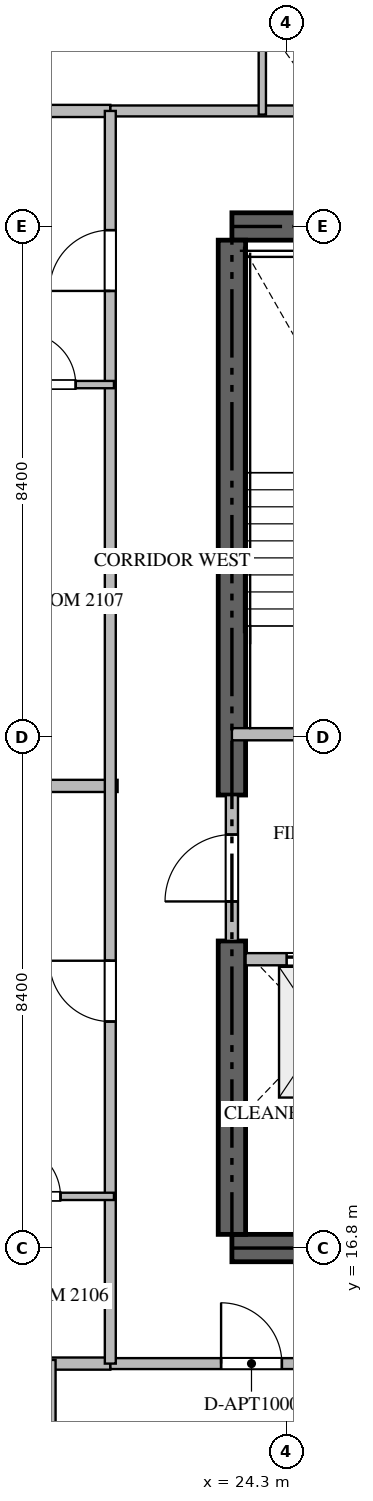
"""IFC4 building model, lengths in metres.
Left out: names, types, materials, properties, quantities, classifications, styles, units other than length and angle.
Written with IfcOpenShell. Run it as: python <this file> out.ifc"""

import sys

from ifc_helpers import new_model, si_unit, direction, frame, frame_2d, origin, place, context, subcontext, project, spatial, rectangle, extrude, source, transform, mapped, element, fill, save


model = new_model("IFC4")
c1 = context("Model", 3, precision=1e-05, world=origin(), true_north=direction((0.0, 1.0)))
c2 = subcontext(c1, "Body", "Model", "MODEL_VIEW")
j1 = project(units=[si_unit("LENGTHUNIT", "METRE"), si_unit("PLANEANGLEUNIT", "RADIAN")], contexts=[c1])
p1 = place(None, origin())
s1 = spatial("IfcSite", under=j1, at=p1, CompositionType="ELEMENT")
p2 = place(p1, origin())
s2 = spatial("IfcBuilding", under=s1, at=p2, CompositionType="ELEMENT")
p3 = place(p2, frame((0.0, 0.0, 86.7)))
s3 = spatial("IfcBuildingStorey", under=s2, at=p3, CompositionType="ELEMENT", Elevation=86.7)
for number, where, z_axis, x_axis in (
    (1, (23.4, 16.8, -0.26), (0.0, 0.0, 1.0), (1.0, 0.0, 0.0)),
    (2, (41.4, 33.6, -0.26), (0.0, 0.0, 1.0), (-1.0, 0.0, 0.0)),
):
    element("IfcWall", number, at=place(p3, frame(where, z_axis=z_axis, x_axis=x_axis)), inside=s3, PredefinedType="SHEAR", context=c2, shape_type="SweptSolid", body=[
        extrude(rectangle(XDim=18.0, YDim=0.45, at=frame_2d((9.0, 0.0))), origin(), (0.0, 0.0, 1.0), 3.748),
    ])
p4 = place(p3, frame((23.4, 17.025, -0.26), z_axis=(0.0, 0.0, 1.0), x_axis=(0.0, 1.0, 0.0)))
e3 = element("IfcWall", 3, at=p4, inside=s3, PredefinedType="SHEAR", context=c2, shape_type="SweptSolid", body=[
    extrude(rectangle(XDim=4.825, YDim=0.45, at=frame_2d((2.413, 0.0))), origin(), (0.0, 0.0, 1.0), 3.748),
])
p5 = place(p3, frame((23.4, 24.25, -0.26), z_axis=(0.0, 0.0, 1.0), x_axis=(0.0, 1.0, 0.0)))
e4 = element("IfcWall", 4, at=p5, inside=s3, PredefinedType="SHEAR", context=c2, shape_type="SweptSolid", body=[
    extrude(rectangle(XDim=9.125, YDim=0.45, at=frame_2d((4.562, 0.0))), origin(), (0.0, 0.0, 1.0), 3.748),
])
p6 = place(p3, frame((23.4, 25.25, 0.0), z_axis=(0.0, 0.0, 1.0), x_axis=(1.0, 0.0, 0.0)))
e5 = element("IfcWall", 5, at=p6, inside=s3, PredefinedType="STANDARD", context=c2, shape_type="SweptSolid", body=[
    extrude(rectangle(XDim=4.45, YDim=0.2, at=frame_2d((2.225, 0.0))), origin(), (0.0, 0.0, 1.0), 3.49),
])
p7 = place(p6, frame((1.65, 0.0, 0.0)))
e6 = element("IfcOpeningElement", 6, at=p7, cuts=e5, PredefinedType="OPENING", context=c2, shape_type="SweptSolid", body=[
    extrude(rectangle(XDim=1.1, YDim=2.15, at=frame_2d((0.55, 1.075))), frame((0.0, 0.11, 0.0), z_axis=(0.0, -1.0, 0.0), x_axis=(1.0, 0.0, 0.0)), (0.0, 0.0, 1.0), 0.22),
])
p8 = place(p3, frame((23.625, 21.55, 0.0), z_axis=(0.0, 0.0, 1.0), x_axis=(1.0, 0.0, 0.0)))
e7 = element("IfcWall", 7, at=p8, inside=s3, PredefinedType="STANDARD", context=c2, shape_type="SweptSolid", body=[
    extrude(rectangle(XDim=2.425, YDim=0.2, at=frame_2d((1.212, 0.0))), origin(), (0.0, 0.0, 1.0), 3.49),
])
p9 = place(p8, frame((0.675, 0.0, 0.0)))
e8 = element("IfcOpeningElement", 8, at=p9, cuts=e7, PredefinedType="OPENING", context=c2, shape_type="SweptSolid", body=[
    extrude(rectangle(XDim=1.2, YDim=2.2, at=frame_2d((0.6, 1.1))), frame((0.0, 0.11, 0.0), z_axis=(0.0, -1.0, 0.0), x_axis=(1.0, 0.0, 0.0)), (0.0, 0.0, 1.0), 0.22),
])
p10 = place(p3, frame((23.625, 19.05, 0.0), z_axis=(0.0, 0.0, 1.0), x_axis=(1.0, 0.0, 0.0)))
e9 = element("IfcWall", 9, at=p10, inside=s3, PredefinedType="STANDARD", context=c2, shape_type="SweptSolid", body=[
    extrude(rectangle(XDim=2.425, YDim=0.2, at=frame_2d((1.212, 0.0))), origin(), (0.0, 0.0, 1.0), 3.49),
])
p11 = place(p3, frame((23.4, 21.852, 0.0), z_axis=(0.0, 0.0, 1.0), x_axis=(0.0, 1.0, 0.0)))
e10 = element("IfcWall", 10, at=p11, inside=s3, PredefinedType="STANDARD", context=c2, shape_type="SweptSolid", body=[
    extrude(rectangle(XDim=2.396, YDim=0.2, at=frame_2d((1.198, 0.0))), origin(), (0.0, 0.0, 1.0), 3.49),
])
p12 = place(p11, frame((0.648, 0.0, 0.0)))
e11 = element("IfcOpeningElement", 11, at=p12, cuts=e10, PredefinedType="OPENING", context=c2, shape_type="SweptSolid", body=[
    extrude(rectangle(XDim=1.1, YDim=2.15, at=frame_2d((0.55, 1.075))), frame((0.0, 0.11, 0.0), z_axis=(0.0, -1.0, 0.0), x_axis=(1.0, 0.0, 0.0)), (0.0, 0.0, 1.0), 0.22),
])
p13 = place(p3, frame((6.082, 24.4, 0.0), z_axis=(0.0, 0.0, 1.0), x_axis=(1.0, 0.0, 0.0)))
e12 = element("IfcWall", 12, at=p13, inside=s3, PredefinedType="PARTITIONING", context=c2, shape_type="SweptSolid", body=[
    extrude(rectangle(XDim=15.438, YDim=0.2, at=frame_2d((7.719, 0.0))), origin(), (0.0, 0.0, 1.0), 3.49),
])
for number, where, z_axis, x_axis in (
    (13, (6.082, 14.9, 0.0), (0.0, 0.0, 1.0), (1.0, 0.0, 0.0)),
    (14, (6.082, 35.5, 0.0), (0.0, 0.0, 1.0), (1.0, 0.0, 0.0)),
):
    element("IfcWall", number, at=place(p3, frame(where, z_axis=z_axis, x_axis=x_axis)), inside=s3, PredefinedType="PARTITIONING", context=c2, shape_type="SweptSolid", body=[
        extrude(rectangle(XDim=15.318, YDim=0.2, at=frame_2d((7.659, 0.0))), origin(), (0.0, 0.0, 1.0), 3.49),
    ])
p14 = place(p3, frame((21.402, 14.9, 0.0), z_axis=(0.0, 0.0, 1.0), x_axis=(1.0, 0.0, 0.0)))
e15 = element("IfcWall", 15, at=p14, inside=s3, PredefinedType="PARTITIONING", context=c2, shape_type="SweptSolid", body=[
    extrude(rectangle(XDim=21.996, YDim=0.18, at=frame_2d((10.998, 0.0))), origin(), (0.0, 0.0, 1.0), 3.49),
])
p15 = place(p14, frame((1.82, 0.0, 0.0)))
e16 = element("IfcOpeningElement", 16, at=p15, cuts=e15, PredefinedType="OPENING", context=c2, shape_type="SweptSolid", body=[
    extrude(rectangle(XDim=1.0, YDim=2.15, at=frame_2d((0.5, 1.075))), frame((0.0, 0.1, 0.0), z_axis=(0.0, -1.0, 0.0), x_axis=(1.0, 0.0, 0.0)), (0.0, 0.0, 1.0), 0.2),
])
p16 = place(p14, frame((5.144, 0.0, 0.0)))
e17 = element("IfcOpeningElement", 17, at=p16, cuts=e15, PredefinedType="OPENING", context=c2, shape_type="SweptSolid", body=[
    extrude(rectangle(XDim=1.0, YDim=2.15, at=frame_2d((0.5, 1.075))), frame((0.0, 0.1, 0.0), z_axis=(0.0, -1.0, 0.0), x_axis=(1.0, 0.0, 0.0)), (0.0, 0.0, 1.0), 0.2),
])
p17 = place(p14, frame((11.758, 0.0, 0.0)))
e18 = element("IfcOpeningElement", 18, at=p17, cuts=e15, PredefinedType="OPENING", context=c2, shape_type="SweptSolid", body=[
    extrude(rectangle(XDim=1.0, YDim=2.15, at=frame_2d((0.5, 1.075))), frame((0.0, 0.1, 0.0), z_axis=(0.0, -1.0, 0.0), x_axis=(1.0, 0.0, 0.0)), (0.0, 0.0, 1.0), 0.2),
])
p18 = place(p14, frame((18.896, 0.0, 0.0)))
e19 = element("IfcOpeningElement", 19, at=p18, cuts=e15, PredefinedType="OPENING", context=c2, shape_type="SweptSolid", body=[
    extrude(rectangle(XDim=1.0, YDim=2.15, at=frame_2d((0.5, 1.075))), frame((0.0, 0.1, 0.0), z_axis=(0.0, -1.0, 0.0), x_axis=(1.0, 0.0, 0.0)), (0.0, 0.0, 1.0), 0.2),
])
p19 = place(p3, frame((21.402, 35.5, 0.0), z_axis=(0.0, 0.0, 1.0), x_axis=(1.0, 0.0, 0.0)))
e20 = element("IfcWall", 20, at=p19, inside=s3, PredefinedType="PARTITIONING", context=c2, shape_type="SweptSolid", body=[
    extrude(rectangle(XDim=21.996, YDim=0.18, at=frame_2d((10.998, 0.0))), origin(), (0.0, 0.0, 1.0), 3.49),
])
p20 = place(p19, frame((15.222, 0.0, 0.0)))
e21 = element("IfcOpeningElement", 21, at=p20, cuts=e20, PredefinedType="OPENING", context=c2, shape_type="SweptSolid", body=[
    extrude(rectangle(XDim=1.0, YDim=2.15, at=frame_2d((0.5, 1.075))), frame((0.0, 0.1, 0.0), z_axis=(0.0, -1.0, 0.0), x_axis=(1.0, 0.0, 0.0)), (0.0, 0.0, 1.0), 0.2),
])
p21 = place(p3, frame((21.4, 14.9, 0.0), z_axis=(0.0, 0.0, 1.0), x_axis=(0.0, 1.0, 0.0)))
e22 = element("IfcWall", 22, at=p21, inside=s3, PredefinedType="PARTITIONING", context=c2, shape_type="SweptSolid", body=[
    extrude(rectangle(XDim=20.6, YDim=0.18, at=frame_2d((10.3, 0.0))), origin(), (0.0, 0.0, 1.0), 3.49),
])
p22 = place(p21, frame((5.625, 0.0, 0.0)))
e23 = element("IfcOpeningElement", 23, at=p22, cuts=e22, PredefinedType="OPENING", context=c2, shape_type="SweptSolid", body=[
    extrude(rectangle(XDim=1.0, YDim=2.15, at=frame_2d((0.5, 1.075))), frame((0.0, 0.1, 0.0), z_axis=(0.0, -1.0, 0.0), x_axis=(1.0, 0.0, 0.0)), (0.0, 0.0, 1.0), 0.2),
])
p23 = place(p21, frame((17.64, 0.0, 0.0)))
e24 = element("IfcOpeningElement", 24, at=p23, cuts=e22, PredefinedType="OPENING", context=c2, shape_type="SweptSolid", body=[
    extrude(rectangle(XDim=1.0, YDim=2.15, at=frame_2d((0.5, 1.075))), frame((0.0, 0.1, 0.0), z_axis=(0.0, -1.0, 0.0), x_axis=(1.0, 0.0, 0.0)), (0.0, 0.0, 1.0), 0.2),
])
p24 = place(p3, frame((20.44, 12.15, 0.0), z_axis=(0.0, 0.0, 1.0), x_axis=(0.0, 1.0, 0.0)))
e25 = element("IfcWall", 25, at=p24, inside=s3, PredefinedType="PARTITIONING", context=c2, shape_type="SweptSolid", body=[
    extrude(rectangle(XDim=2.81, YDim=0.12, at=frame_2d((1.405, 0.0))), origin(), (0.0, 0.0, 1.0), 3.49),
])
p25 = place(p3, frame((23.9, 37.648, 0.0), z_axis=(0.0, 0.0, 1.0), x_axis=(0.0, -1.0, 0.0)))
e26 = element("IfcWall", 26, at=p25, inside=s3, PredefinedType="PARTITIONING", context=c2, shape_type="SweptSolid", body=[
    extrude(rectangle(XDim=2.208, YDim=0.12, at=frame_2d((1.104, 0.0))), origin(), (0.0, 0.0, 1.0), 3.49),
])
p26 = place(p3, frame((18.852, 17.65, 0.0), z_axis=(0.0, 0.0, 1.0), x_axis=(1.0, 0.0, 0.0)))
e27 = element("IfcWall", 27, at=p26, inside=s3, PredefinedType="PARTITIONING", context=c2, shape_type="SweptSolid", body=[
    extrude(rectangle(XDim=2.608, YDim=0.12, at=frame_2d((1.304, 0.0))), origin(), (0.0, 0.0, 1.0), 3.49),
])
p27 = place(p26, frame((0.879, 0.0, 0.0)))
e28 = element("IfcOpeningElement", 28, at=p27, cuts=e27, PredefinedType="OPENING", context=c2, shape_type="SweptSolid", body=[
    extrude(rectangle(XDim=0.85, YDim=2.1, at=frame_2d((0.425, 1.05))), frame((0.0, 0.07, 0.0), z_axis=(0.0, -1.0, 0.0), x_axis=(1.0, 0.0, 0.0)), (0.0, 0.0, 1.0), 0.14),
])
p28 = place(p3, frame((19.352, 31.0, 0.0), z_axis=(0.0, 0.0, 1.0), x_axis=(1.0, 0.0, 0.0)))
e29 = element("IfcWall", 29, at=p28, inside=s3, PredefinedType="PARTITIONING", context=c2, shape_type="SweptSolid", body=[
    extrude(rectangle(XDim=2.108, YDim=0.12, at=frame_2d((1.054, 0.0))), origin(), (0.0, 0.0, 1.0), 3.49),
])
p29 = place(p28, frame((0.629, 0.0, 0.0)))
e30 = element("IfcOpeningElement", 30, at=p29, cuts=e29, PredefinedType="OPENING", context=c2, shape_type="SweptSolid", body=[
    extrude(rectangle(XDim=0.85, YDim=2.1, at=frame_2d((0.425, 1.05))), frame((0.0, 0.07, 0.0), z_axis=(0.0, -1.0, 0.0), x_axis=(1.0, 0.0, 0.0)), (0.0, 0.0, 1.0), 0.14),
])
m1 = source(origin(), c2, "Body", "SweptSolid", [
    extrude(rectangle(XDim=1.2, YDim=2.2, at=frame_2d((0.6, 1.1))), frame((0.0, 0.025, 0.0), z_axis=(0.0, -1.0, 0.0), x_axis=(1.0, 0.0, 0.0)), (0.0, 0.0, 1.0), 0.05),
])
p30 = place(p9, origin())
e31 = element("IfcDoor", 31, at=p30, inside=s3, OperationType="DOUBLE_DOOR_SLIDING", PredefinedType="DOOR", context=c2, shape_type="MappedRepresentation", body=[
    mapped(m1, transform((0.0, 0.0, 0.0), scale=1.0)),
])
fill(e8, e31)
m2 = source(origin(), c2, "Body", "SweptSolid", [
    extrude(rectangle(XDim=1.1, YDim=2.15, at=frame_2d((0.55, 1.075))), frame((0.0, 0.025, 0.0), z_axis=(0.0, -1.0, 0.0), x_axis=(1.0, 0.0, 0.0)), (0.0, 0.0, 1.0), 0.05),
])
p31 = place(p12, origin())
e32 = element("IfcDoor", 32, at=p31, inside=s3, OperationType="SINGLE_SWING_LEFT", PredefinedType="DOOR", context=c2, shape_type="MappedRepresentation", body=[
    mapped(m2, transform((0.0, 0.0, 0.0), scale=1.0)),
])
fill(e11, e32)
m3 = source(origin(), c2, "Body", "SweptSolid", [
    extrude(rectangle(XDim=1.0, YDim=2.15, at=frame_2d((0.5, 1.075))), frame((0.0, 0.025, 0.0), z_axis=(0.0, -1.0, 0.0), x_axis=(1.0, 0.0, 0.0)), (0.0, 0.0, 1.0), 0.05),
])
p32 = place(p15, origin())
e33 = element("IfcDoor", 33, at=p32, inside=s3, OperationType="SINGLE_SWING_LEFT", PredefinedType="DOOR", context=c2, shape_type="MappedRepresentation", body=[
    mapped(m3, transform((0.0, 0.0, 0.0), scale=1.0)),
])
fill(e16, e33)
p33 = place(p22, origin())
e34 = element("IfcDoor", 34, at=p33, inside=s3, OperationType="SINGLE_SWING_RIGHT", PredefinedType="DOOR", context=c2, shape_type="MappedRepresentation", body=[
    mapped(m3, transform((0.0, 0.0, 0.0), scale=1.0)),
])
fill(e23, e34)
p34 = place(p23, origin())
e35 = element("IfcDoor", 35, at=p34, inside=s3, OperationType="SINGLE_SWING_LEFT", PredefinedType="DOOR", context=c2, shape_type="MappedRepresentation", body=[
    mapped(m3, transform((0.0, 0.0, 0.0), scale=1.0)),
])
fill(e24, e35)
m4 = source(origin(), c2, "Body", "SweptSolid", [
    extrude(rectangle(XDim=0.85, YDim=2.1, at=frame_2d((0.425, 1.05))), frame((0.0, 0.025, 0.0), z_axis=(0.0, -1.0, 0.0), x_axis=(1.0, 0.0, 0.0)), (0.0, 0.0, 1.0), 0.05),
])
p35 = place(p27, origin())
e36 = element("IfcDoor", 36, at=p35, inside=s3, OperationType="SINGLE_SWING_LEFT", PredefinedType="DOOR", context=c2, shape_type="MappedRepresentation", body=[
    mapped(m4, transform((0.0, 0.0, 0.0), scale=1.0)),
])
fill(e28, e36)
p36 = place(p29, origin())
e37 = element("IfcDoor", 37, at=p36, inside=s3, OperationType="SINGLE_SWING_LEFT", PredefinedType="DOOR", context=c2, shape_type="MappedRepresentation", body=[
    mapped(m4, transform((0.0, 0.0, 0.0), scale=1.0)),
])
fill(e30, e37)
save(model, sys.argv[1])
